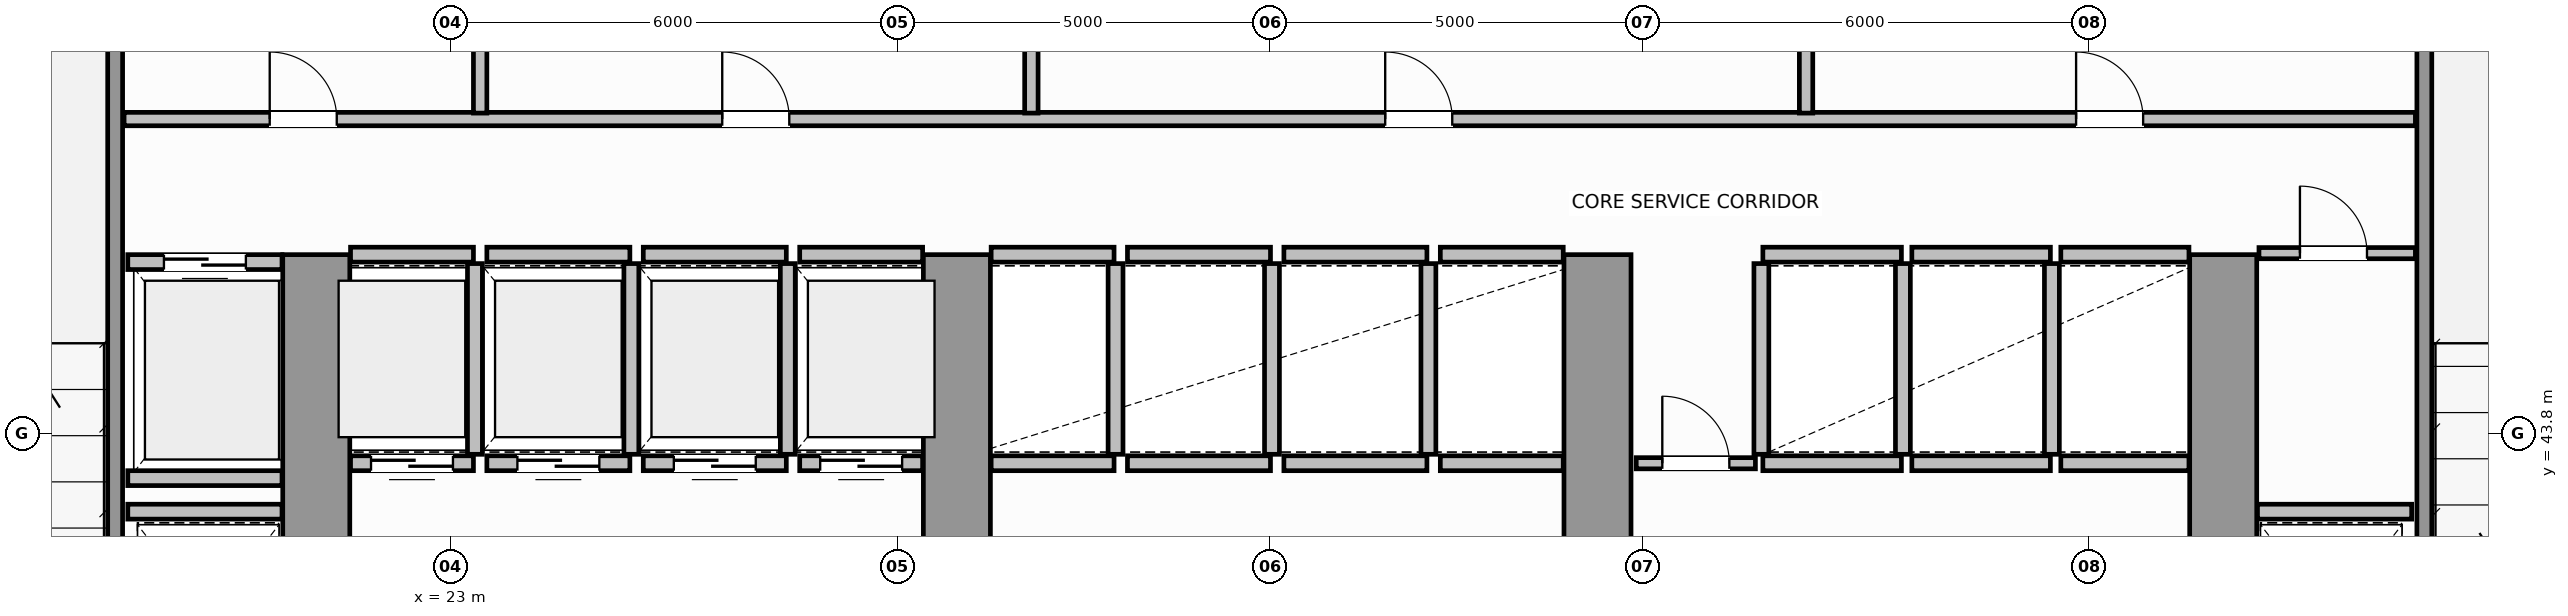
"""IFC4 building model, lengths in metres.
Left out: names, types, materials, properties, quantities, classifications, styles, units other than length and angle.
Written with IfcOpenShell. Run it as: python <this file> out.ifc"""

import sys

from ifc_helpers import new_model, si_unit, direction, frame, frame_2d, origin, place, context, subcontext, project, spatial, rectangle, extrude, source, transform, mapped, element, fill, save


model = new_model("IFC4")
c1 = context("Model", 3, precision=1e-05, world=origin(), true_north=direction((0.0, 1.0)))
c2 = subcontext(c1, "Body", "Model", "MODEL_VIEW")
j1 = project(units=[si_unit("LENGTHUNIT", "METRE"), si_unit("PLANEANGLEUNIT", "RADIAN")], contexts=[c1])
p1 = place(None, origin())
s1 = spatial("IfcSite", under=j1, at=p1, CompositionType="ELEMENT")
p2 = place(p1, origin())
s2 = spatial("IfcBuilding", under=s1, at=p2, CompositionType="ELEMENT")
p3 = place(p2, frame((0.0, 0.0, 53.0)))
s3 = spatial("IfcBuildingStorey", under=s2, at=p3, CompositionType="ELEMENT", Elevation=53.0)
for number, where, z_axis, x_axis in (
    (1, (21.2, 36.97, 0.0), (0.0, 0.0, 1.0), (0.0, 1.0, 0.0)),
    (2, (29.8, 36.97, 0.0), (0.0, 0.0, 1.0), (0.0, 1.0, 0.0)),
    (3, (38.4, 36.97, 0.0), (0.0, 0.0, 1.0), (0.0, 1.0, 0.0)),
    (4, (46.8, 36.97, 0.0), (0.0, 0.0, 1.0), (0.0, 1.0, 0.0)),
):
    element("IfcWall", number, at=place(p3, frame(where, z_axis=z_axis, x_axis=x_axis)), inside=s3, PredefinedType="SHEAR", context=c2, shape_type="SweptSolid", body=[
        extrude(rectangle(XDim=9.23, YDim=0.9, at=frame_2d((4.615, 0.0))), origin(), (0.0, 0.0, 1.0), 3.8),
    ])
for number, where, z_axis, x_axis in (
    (5, (18.5, 39.96, 0.0), (0.0, 0.0, 1.0), (0.0, 1.0, 0.0)),
    (6, (49.5, 39.96, 0.0), (0.0, 0.0, 1.0), (0.0, 1.0, 0.0)),
):
    element("IfcWall", number, at=place(p3, frame(where, z_axis=z_axis, x_axis=x_axis)), inside=s3, PredefinedType="SOLIDWALL", context=c2, shape_type="SweptSolid", body=[
        extrude(rectangle(XDim=9.93, YDim=0.2, at=frame_2d((4.965, 0.0))), origin(), (0.0, 0.0, 1.0), 3.8),
    ])
p4 = place(p3, frame((21.66, 43.4, 0.0), z_axis=(0.0, 0.0, 1.0), x_axis=(1.0, 0.0, 0.0)))
e7 = element("IfcWall", 7, at=p4, inside=s3, PredefinedType="SOLIDWALL", context=c2, shape_type="SweptSolid", body=[
    extrude(rectangle(XDim=1.65, YDim=0.2, at=frame_2d((0.825, 0.0))), origin(), (0.0, 0.0, 1.0), 3.58),
])
p5 = place(p4, frame((0.275, 0.0, 0.0)))
e8 = element("IfcOpeningElement", 8, at=p5, cuts=e7, PredefinedType="OPENING", context=c2, shape_type="SweptSolid", body=[
    extrude(rectangle(XDim=1.1, YDim=2.15, at=frame_2d((0.55, 1.075))), frame((0.0, 0.11, 0.0), z_axis=(0.0, -1.0, 0.0), x_axis=(1.0, 0.0, 0.0)), (0.0, 0.0, 1.0), 0.22),
])
p6 = place(p3, frame((21.66, 46.2, 0.0), z_axis=(0.0, 0.0, 1.0), x_axis=(1.0, 0.0, 0.0)))
e9 = element("IfcWall", 9, at=p6, inside=s3, PredefinedType="SOLIDWALL", context=c2, shape_type="SweptSolid", body=[
    extrude(rectangle(XDim=1.65, YDim=0.2, at=frame_2d((0.825, 0.0))), origin(), (0.0, 0.0, 1.0), 3.58),
])
p7 = place(p3, frame((23.33, 43.52, 0.0), z_axis=(0.0, 0.0, 1.0), x_axis=(0.0, 1.0, 0.0)))
e10 = element("IfcWall", 10, at=p7, inside=s3, PredefinedType="SOLIDWALL", context=c2, shape_type="SweptSolid", body=[
    extrude(rectangle(XDim=2.56, YDim=0.2, at=frame_2d((1.28, 0.0))), origin(), (0.0, 0.0, 1.0), 3.58),
])
p8 = place(p3, frame((23.49, 43.4, 0.0), z_axis=(0.0, 0.0, 1.0), x_axis=(1.0, 0.0, 0.0)))
e11 = element("IfcWall", 11, at=p8, inside=s3, PredefinedType="SOLIDWALL", context=c2, shape_type="SweptSolid", body=[
    extrude(rectangle(XDim=1.92, YDim=0.2, at=frame_2d((0.96, 0.0))), origin(), (0.0, 0.0, 1.0), 3.58),
])
p9 = place(p8, frame((0.41, 0.0, 0.0)))
e12 = element("IfcOpeningElement", 12, at=p9, cuts=e11, PredefinedType="OPENING", context=c2, shape_type="SweptSolid", body=[
    extrude(rectangle(XDim=1.1, YDim=2.15, at=frame_2d((0.55, 1.075))), frame((0.0, 0.11, 0.0), z_axis=(0.0, -1.0, 0.0), x_axis=(1.0, 0.0, 0.0)), (0.0, 0.0, 1.0), 0.22),
])
p10 = place(p3, frame((23.49, 46.2, 0.0), z_axis=(0.0, 0.0, 1.0), x_axis=(1.0, 0.0, 0.0)))
e13 = element("IfcWall", 13, at=p10, inside=s3, PredefinedType="SOLIDWALL", context=c2, shape_type="SweptSolid", body=[
    extrude(rectangle(XDim=1.92, YDim=0.2, at=frame_2d((0.96, 0.0))), origin(), (0.0, 0.0, 1.0), 3.58),
])
p11 = place(p3, frame((25.43, 43.52, 0.0), z_axis=(0.0, 0.0, 1.0), x_axis=(0.0, 1.0, 0.0)))
e14 = element("IfcWall", 14, at=p11, inside=s3, PredefinedType="SOLIDWALL", context=c2, shape_type="SweptSolid", body=[
    extrude(rectangle(XDim=2.56, YDim=0.2, at=frame_2d((1.28, 0.0))), origin(), (0.0, 0.0, 1.0), 3.58),
])
p12 = place(p3, frame((25.59, 43.4, 0.0), z_axis=(0.0, 0.0, 1.0), x_axis=(1.0, 0.0, 0.0)))
e15 = element("IfcWall", 15, at=p12, inside=s3, PredefinedType="SOLIDWALL", context=c2, shape_type="SweptSolid", body=[
    extrude(rectangle(XDim=1.92, YDim=0.2, at=frame_2d((0.96, 0.0))), origin(), (0.0, 0.0, 1.0), 3.58),
])
p13 = place(p12, frame((0.41, 0.0, 0.0)))
e16 = element("IfcOpeningElement", 16, at=p13, cuts=e15, PredefinedType="OPENING", context=c2, shape_type="SweptSolid", body=[
    extrude(rectangle(XDim=1.1, YDim=2.15, at=frame_2d((0.55, 1.075))), frame((0.0, 0.11, 0.0), z_axis=(0.0, -1.0, 0.0), x_axis=(1.0, 0.0, 0.0)), (0.0, 0.0, 1.0), 0.22),
])
p14 = place(p3, frame((25.59, 46.2, 0.0), z_axis=(0.0, 0.0, 1.0), x_axis=(1.0, 0.0, 0.0)))
e17 = element("IfcWall", 17, at=p14, inside=s3, PredefinedType="SOLIDWALL", context=c2, shape_type="SweptSolid", body=[
    extrude(rectangle(XDim=1.92, YDim=0.2, at=frame_2d((0.96, 0.0))), origin(), (0.0, 0.0, 1.0), 3.58),
])
p15 = place(p3, frame((27.53, 43.52, 0.0), z_axis=(0.0, 0.0, 1.0), x_axis=(0.0, 1.0, 0.0)))
e18 = element("IfcWall", 18, at=p15, inside=s3, PredefinedType="SOLIDWALL", context=c2, shape_type="SweptSolid", body=[
    extrude(rectangle(XDim=2.56, YDim=0.2, at=frame_2d((1.28, 0.0))), origin(), (0.0, 0.0, 1.0), 3.58),
])
p16 = place(p3, frame((27.69, 43.4, 0.0), z_axis=(0.0, 0.0, 1.0), x_axis=(1.0, 0.0, 0.0)))
e19 = element("IfcWall", 19, at=p16, inside=s3, PredefinedType="SOLIDWALL", context=c2, shape_type="SweptSolid", body=[
    extrude(rectangle(XDim=1.65, YDim=0.2, at=frame_2d((0.825, 0.0))), origin(), (0.0, 0.0, 1.0), 3.58),
])
p17 = place(p16, frame((0.275, 0.0, 0.0)))
e20 = element("IfcOpeningElement", 20, at=p17, cuts=e19, PredefinedType="OPENING", context=c2, shape_type="SweptSolid", body=[
    extrude(rectangle(XDim=1.1, YDim=2.15, at=frame_2d((0.55, 1.075))), frame((0.0, 0.11, 0.0), z_axis=(0.0, -1.0, 0.0), x_axis=(1.0, 0.0, 0.0)), (0.0, 0.0, 1.0), 0.22),
])
p18 = place(p3, frame((27.69, 46.2, 0.0), z_axis=(0.0, 0.0, 1.0), x_axis=(1.0, 0.0, 0.0)))
e21 = element("IfcWall", 21, at=p18, inside=s3, PredefinedType="SOLIDWALL", context=c2, shape_type="SweptSolid", body=[
    extrude(rectangle(XDim=1.65, YDim=0.2, at=frame_2d((0.825, 0.0))), origin(), (0.0, 0.0, 1.0), 3.58),
])
for number, where, z_axis, x_axis in (
    (22, (30.26, 43.4, 0.0), (0.0, 0.0, 1.0), (1.0, 0.0, 0.0)),
    (23, (30.26, 46.2, 0.0), (0.0, 0.0, 1.0), (1.0, 0.0, 0.0)),
):
    element("IfcWall", number, at=place(p3, frame(where, z_axis=z_axis, x_axis=x_axis)), inside=s3, PredefinedType="SOLIDWALL", context=c2, shape_type="SweptSolid", body=[
        extrude(rectangle(XDim=1.65, YDim=0.2, at=frame_2d((0.825, 0.0))), origin(), (0.0, 0.0, 1.0), 3.58),
    ])
p19 = place(p3, frame((31.93, 43.52, 0.0), z_axis=(0.0, 0.0, 1.0), x_axis=(0.0, 1.0, 0.0)))
e24 = element("IfcWall", 24, at=p19, inside=s3, PredefinedType="SOLIDWALL", context=c2, shape_type="SweptSolid", body=[
    extrude(rectangle(XDim=2.56, YDim=0.2, at=frame_2d((1.28, 0.0))), origin(), (0.0, 0.0, 1.0), 3.58),
])
for number, where, z_axis, x_axis in (
    (25, (32.09, 43.4, 0.0), (0.0, 0.0, 1.0), (1.0, 0.0, 0.0)),
    (26, (32.09, 46.2, 0.0), (0.0, 0.0, 1.0), (1.0, 0.0, 0.0)),
):
    element("IfcWall", number, at=place(p3, frame(where, z_axis=z_axis, x_axis=x_axis)), inside=s3, PredefinedType="SOLIDWALL", context=c2, shape_type="SweptSolid", body=[
        extrude(rectangle(XDim=1.92, YDim=0.2, at=frame_2d((0.96, 0.0))), origin(), (0.0, 0.0, 1.0), 3.58),
    ])
p20 = place(p3, frame((34.03, 43.52, 0.0), z_axis=(0.0, 0.0, 1.0), x_axis=(0.0, 1.0, 0.0)))
e27 = element("IfcWall", 27, at=p20, inside=s3, PredefinedType="SOLIDWALL", context=c2, shape_type="SweptSolid", body=[
    extrude(rectangle(XDim=2.56, YDim=0.2, at=frame_2d((1.28, 0.0))), origin(), (0.0, 0.0, 1.0), 3.58),
])
for number, where, z_axis, x_axis in (
    (28, (34.19, 43.4, 0.0), (0.0, 0.0, 1.0), (1.0, 0.0, 0.0)),
    (29, (34.19, 46.2, 0.0), (0.0, 0.0, 1.0), (1.0, 0.0, 0.0)),
):
    element("IfcWall", number, at=place(p3, frame(where, z_axis=z_axis, x_axis=x_axis)), inside=s3, PredefinedType="SOLIDWALL", context=c2, shape_type="SweptSolid", body=[
        extrude(rectangle(XDim=1.92, YDim=0.2, at=frame_2d((0.96, 0.0))), origin(), (0.0, 0.0, 1.0), 3.58),
    ])
p21 = place(p3, frame((36.13, 43.52, 0.0), z_axis=(0.0, 0.0, 1.0), x_axis=(0.0, 1.0, 0.0)))
e30 = element("IfcWall", 30, at=p21, inside=s3, PredefinedType="SOLIDWALL", context=c2, shape_type="SweptSolid", body=[
    extrude(rectangle(XDim=2.56, YDim=0.2, at=frame_2d((1.28, 0.0))), origin(), (0.0, 0.0, 1.0), 3.58),
])
for number, where, z_axis, x_axis in (
    (31, (36.29, 43.4, 0.0), (0.0, 0.0, 1.0), (1.0, 0.0, 0.0)),
    (32, (36.29, 46.2, 0.0), (0.0, 0.0, 1.0), (1.0, 0.0, 0.0)),
):
    element("IfcWall", number, at=place(p3, frame(where, z_axis=z_axis, x_axis=x_axis)), inside=s3, PredefinedType="SOLIDWALL", context=c2, shape_type="SweptSolid", body=[
        extrude(rectangle(XDim=1.65, YDim=0.2, at=frame_2d((0.825, 0.0))), origin(), (0.0, 0.0, 1.0), 3.58),
    ])
for number, where, z_axis, x_axis in (
    (33, (40.62, 43.4, 0.0), (0.0, 0.0, 1.0), (1.0, 0.0, 0.0)),
    (34, (40.62, 46.2, 0.0), (0.0, 0.0, 1.0), (1.0, 0.0, 0.0)),
):
    element("IfcWall", number, at=place(p3, frame(where, z_axis=z_axis, x_axis=x_axis)), inside=s3, PredefinedType="SOLIDWALL", context=c2, shape_type="SweptSolid", body=[
        extrude(rectangle(XDim=1.86, YDim=0.2, at=frame_2d((0.93, 0.0))), origin(), (0.0, 0.0, 1.0), 3.58),
    ])
for number, where, z_axis, x_axis in (
    (35, (40.6, 43.52, 0.0), (0.0, 0.0, 1.0), (0.0, 1.0, 0.0)),
    (36, (42.5, 43.52, 0.0), (0.0, 0.0, 1.0), (0.0, 1.0, 0.0)),
):
    element("IfcWall", number, at=place(p3, frame(where, z_axis=z_axis, x_axis=x_axis)), inside=s3, PredefinedType="SOLIDWALL", context=c2, shape_type="SweptSolid", body=[
        extrude(rectangle(XDim=2.56, YDim=0.2, at=frame_2d((1.28, 0.0))), origin(), (0.0, 0.0, 1.0), 3.58),
    ])
for number, where, z_axis, x_axis in (
    (37, (42.62, 43.4, 0.0), (0.0, 0.0, 1.0), (1.0, 0.0, 0.0)),
    (38, (42.62, 46.2, 0.0), (0.0, 0.0, 1.0), (1.0, 0.0, 0.0)),
):
    element("IfcWall", number, at=place(p3, frame(where, z_axis=z_axis, x_axis=x_axis)), inside=s3, PredefinedType="SOLIDWALL", context=c2, shape_type="SweptSolid", body=[
        extrude(rectangle(XDim=1.86, YDim=0.2, at=frame_2d((0.93, 0.0))), origin(), (0.0, 0.0, 1.0), 3.58),
    ])
p22 = place(p3, frame((44.5, 43.52, 0.0), z_axis=(0.0, 0.0, 1.0), x_axis=(0.0, 1.0, 0.0)))
e39 = element("IfcWall", 39, at=p22, inside=s3, PredefinedType="SOLIDWALL", context=c2, shape_type="SweptSolid", body=[
    extrude(rectangle(XDim=2.56, YDim=0.2, at=frame_2d((1.28, 0.0))), origin(), (0.0, 0.0, 1.0), 3.58),
])
for number, where, z_axis, x_axis in (
    (40, (44.62, 43.4, 0.0), (0.0, 0.0, 1.0), (1.0, 0.0, 0.0)),
    (41, (44.62, 46.2, 0.0), (0.0, 0.0, 1.0), (1.0, 0.0, 0.0)),
):
    element("IfcWall", number, at=place(p3, frame(where, z_axis=z_axis, x_axis=x_axis)), inside=s3, PredefinedType="SOLIDWALL", context=c2, shape_type="SweptSolid", body=[
        extrude(rectangle(XDim=1.72, YDim=0.2, at=frame_2d((0.86, 0.0))), origin(), (0.0, 0.0, 1.0), 3.58),
    ])
p23 = place(p3, frame((18.67, 46.1, 0.0), z_axis=(0.0, 0.0, 1.0), x_axis=(1.0, 0.0, 0.0)))
e42 = element("IfcWall", 42, at=p23, inside=s3, PredefinedType="SOLIDWALL", context=c2, shape_type="SweptSolid", body=[
    extrude(rectangle(XDim=2.07, YDim=0.2, at=frame_2d((1.035, 0.0))), origin(), (0.0, 0.0, 1.0), 3.58),
])
p24 = place(p23, frame((0.485, 0.0, 0.0)))
e43 = element("IfcOpeningElement", 43, at=p24, cuts=e42, PredefinedType="OPENING", context=c2, shape_type="SweptSolid", body=[
    extrude(rectangle(XDim=1.1, YDim=2.15, at=frame_2d((0.55, 1.075))), frame((0.0, 0.11, 0.0), z_axis=(0.0, -1.0, 0.0), x_axis=(1.0, 0.0, 0.0)), (0.0, 0.0, 1.0), 0.22),
])
for number, where, z_axis, x_axis in (
    (44, (18.67, 43.2, 0.0), (0.0, 0.0, 1.0), (1.0, 0.0, 0.0)),
    (45, (18.67, 42.75, 0.0), (0.0, 0.0, 1.0), (1.0, 0.0, 0.0)),
    (46, (47.26, 42.75, 0.0), (0.0, 0.0, 1.0), (1.0, 0.0, 0.0)),
):
    element("IfcWall", number, at=place(p3, frame(where, z_axis=z_axis, x_axis=x_axis)), inside=s3, PredefinedType="SOLIDWALL", context=c2, shape_type="SweptSolid", body=[
        extrude(rectangle(XDim=2.07, YDim=0.2, at=frame_2d((1.035, 0.0))), origin(), (0.0, 0.0, 1.0), 3.58),
    ])
p25 = place(p3, frame((47.28, 46.22, 0.0), z_axis=(0.0, 0.0, 1.0), x_axis=(1.0, 0.0, 0.0)))
e47 = element("IfcWall", 47, at=p25, inside=s3, PredefinedType="PARTITIONING", context=c2, shape_type="SweptSolid", body=[
    extrude(rectangle(XDim=2.1, YDim=0.15, at=frame_2d((1.05, 0.0))), origin(), (0.0, 0.0, 1.0), 3.58),
])
p26 = place(p25, frame((0.55, 0.0, 0.0)))
e48 = element("IfcOpeningElement", 48, at=p26, cuts=e47, PredefinedType="OPENING", context=c2, shape_type="SweptSolid", body=[
    extrude(rectangle(XDim=0.9, YDim=2.1, at=frame_2d((0.45, 1.05))), frame((0.0, 0.085, 0.0), z_axis=(0.0, -1.0, 0.0), x_axis=(1.0, 0.0, 0.0)), (0.0, 0.0, 1.0), 0.17),
])
p27 = place(p3, frame((38.92, 43.4, 0.0), z_axis=(0.0, 0.0, 1.0), x_axis=(1.0, 0.0, 0.0)))
e49 = element("IfcWall", 49, at=p27, inside=s3, PredefinedType="PARTITIONING", context=c2, shape_type="SweptSolid", body=[
    extrude(rectangle(XDim=1.6, YDim=0.15, at=frame_2d((0.8, 0.0))), origin(), (0.0, 0.0, 1.0), 3.58),
])
p28 = place(p27, frame((0.35, 0.0, 0.0)))
e50 = element("IfcOpeningElement", 50, at=p28, cuts=e49, PredefinedType="OPENING", context=c2, shape_type="SweptSolid", body=[
    extrude(rectangle(XDim=0.9, YDim=2.1, at=frame_2d((0.45, 1.05))), frame((0.0, 0.085, 0.0), z_axis=(0.0, -1.0, 0.0), x_axis=(1.0, 0.0, 0.0)), (0.0, 0.0, 1.0), 0.17),
])
p29 = place(p3, frame((18.62, 48.02, 0.0), z_axis=(0.0, 0.0, 1.0), x_axis=(1.0, 0.0, 0.0)))
e51 = element("IfcWall", 51, at=p29, inside=s3, PredefinedType="PLUMBINGWALL", context=c2, shape_type="SweptSolid", body=[
    extrude(rectangle(XDim=30.76, YDim=0.18, at=frame_2d((15.38, 0.0))), origin(), (0.0, 0.0, 1.0), 3.58),
])
p30 = place(p29, frame((1.955, 0.0, 0.0)))
e52 = element("IfcOpeningElement", 52, at=p30, cuts=e51, PredefinedType="OPENING", context=c2, shape_type="SweptSolid", body=[
    extrude(rectangle(XDim=0.9, YDim=2.15, at=frame_2d((0.45, 1.075))), frame((0.0, 0.1, 0.0), z_axis=(0.0, -1.0, 0.0), x_axis=(1.0, 0.0, 0.0)), (0.0, 0.0, 1.0), 0.2),
])
p31 = place(p29, frame((8.03, 0.0, 0.0)))
e53 = element("IfcOpeningElement", 53, at=p31, cuts=e51, PredefinedType="OPENING", context=c2, shape_type="SweptSolid", body=[
    extrude(rectangle(XDim=0.9, YDim=2.15, at=frame_2d((0.45, 1.075))), frame((0.0, 0.1, 0.0), z_axis=(0.0, -1.0, 0.0), x_axis=(1.0, 0.0, 0.0)), (0.0, 0.0, 1.0), 0.2),
])
p32 = place(p29, frame((16.93, 0.0, 0.0)))
e54 = element("IfcOpeningElement", 54, at=p32, cuts=e51, PredefinedType="OPENING", context=c2, shape_type="SweptSolid", body=[
    extrude(rectangle(XDim=0.9, YDim=2.15, at=frame_2d((0.45, 1.075))), frame((0.0, 0.1, 0.0), z_axis=(0.0, -1.0, 0.0), x_axis=(1.0, 0.0, 0.0)), (0.0, 0.0, 1.0), 0.2),
])
p33 = place(p29, frame((26.205, 0.0, 0.0)))
e55 = element("IfcOpeningElement", 55, at=p33, cuts=e51, PredefinedType="OPENING", context=c2, shape_type="SweptSolid", body=[
    extrude(rectangle(XDim=0.9, YDim=2.15, at=frame_2d((0.45, 1.075))), frame((0.0, 0.1, 0.0), z_axis=(0.0, -1.0, 0.0), x_axis=(1.0, 0.0, 0.0)), (0.0, 0.0, 1.0), 0.2),
])
for number, where, z_axis, x_axis in (
    (56, (23.4, 48.1, 0.0), (0.0, 0.0, 1.0), (0.0, 1.0, 0.0)),
    (57, (30.8, 48.1, 0.0), (0.0, 0.0, 1.0), (0.0, 1.0, 0.0)),
    (58, (41.2, 48.1, 0.0), (0.0, 0.0, 1.0), (0.0, 1.0, 0.0)),
):
    element("IfcWall", number, at=place(p3, frame(where, z_axis=z_axis, x_axis=x_axis)), inside=s3, PredefinedType="PLUMBINGWALL", context=c2, shape_type="SweptSolid", body=[
        extrude(rectangle(XDim=1.98, YDim=0.18, at=frame_2d((0.99, 0.0))), origin(), (0.0, 0.0, 1.0), 3.58),
    ])
m1 = source(origin(), c2, "Body", "SweptSolid", [
    extrude(rectangle(XDim=1.1, YDim=2.15, at=frame_2d((0.55, 1.075))), frame((0.0, 0.025, 0.0), z_axis=(0.0, -1.0, 0.0), x_axis=(1.0, 0.0, 0.0)), (0.0, 0.0, 1.0), 0.05),
])
p34 = place(p5, origin())
e59 = element("IfcDoor", 59, at=p34, inside=s3, OperationType="DOUBLE_DOOR_SLIDING", PredefinedType="DOOR", context=c2, shape_type="MappedRepresentation", body=[
    mapped(m1, transform((0.0, 0.0, 0.0), scale=1.0)),
])
fill(e8, e59)
p35 = place(p9, origin())
e60 = element("IfcDoor", 60, at=p35, inside=s3, OperationType="DOUBLE_DOOR_SLIDING", PredefinedType="DOOR", context=c2, shape_type="MappedRepresentation", body=[
    mapped(m1, transform((0.0, 0.0, 0.0), scale=1.0)),
])
fill(e12, e60)
p36 = place(p13, origin())
e61 = element("IfcDoor", 61, at=p36, inside=s3, OperationType="DOUBLE_DOOR_SLIDING", PredefinedType="DOOR", context=c2, shape_type="MappedRepresentation", body=[
    mapped(m1, transform((0.0, 0.0, 0.0), scale=1.0)),
])
fill(e16, e61)
p37 = place(p17, origin())
e62 = element("IfcDoor", 62, at=p37, inside=s3, OperationType="DOUBLE_DOOR_SLIDING", PredefinedType="DOOR", context=c2, shape_type="MappedRepresentation", body=[
    mapped(m1, transform((0.0, 0.0, 0.0), scale=1.0)),
])
fill(e20, e62)
p38 = place(p24, origin())
e63 = element("IfcDoor", 63, at=p38, inside=s3, OperationType="DOUBLE_DOOR_SLIDING", PredefinedType="DOOR", context=c2, shape_type="MappedRepresentation", body=[
    mapped(m1, transform((0.0, 0.0, 0.0), scale=1.0)),
])
fill(e43, e63)
m2 = source(origin(), c2, "Body", "SweptSolid", [
    extrude(rectangle(XDim=0.9, YDim=2.1, at=frame_2d((0.45, 1.05))), frame((0.0, 0.025, 0.0), z_axis=(0.0, -1.0, 0.0), x_axis=(1.0, 0.0, 0.0)), (0.0, 0.0, 1.0), 0.05),
])
p39 = place(p26, origin())
e64 = element("IfcDoor", 64, at=p39, inside=s3, OperationType="SINGLE_SWING_RIGHT", PredefinedType="DOOR", context=c2, shape_type="MappedRepresentation", body=[
    mapped(m2, transform((0.0, 0.0, 0.0), scale=1.0)),
])
fill(e48, e64)
p40 = place(p28, origin())
e65 = element("IfcDoor", 65, at=p40, inside=s3, OperationType="SINGLE_SWING_LEFT", PredefinedType="DOOR", context=c2, shape_type="MappedRepresentation", body=[
    mapped(m2, transform((0.0, 0.0, 0.0), scale=1.0)),
])
fill(e50, e65)
m3 = source(origin(), c2, "Body", "SweptSolid", [
    extrude(rectangle(XDim=0.9, YDim=2.15, at=frame_2d((0.45, 1.075))), frame((0.0, 0.025, 0.0), z_axis=(0.0, -1.0, 0.0), x_axis=(1.0, 0.0, 0.0)), (0.0, 0.0, 1.0), 0.05),
])
p41 = place(p30, origin())
e66 = element("IfcDoor", 66, at=p41, inside=s3, OperationType="SINGLE_SWING_LEFT", PredefinedType="DOOR", context=c2, shape_type="MappedRepresentation", body=[
    mapped(m3, transform((0.0, 0.0, 0.0), scale=1.0)),
])
fill(e52, e66)
p42 = place(p31, origin())
e67 = element("IfcDoor", 67, at=p42, inside=s3, OperationType="SINGLE_SWING_RIGHT", PredefinedType="DOOR", context=c2, shape_type="MappedRepresentation", body=[
    mapped(m3, transform((0.0, 0.0, 0.0), scale=1.0)),
])
fill(e53, e67)
p43 = place(p32, origin())
e68 = element("IfcDoor", 68, at=p43, inside=s3, OperationType="SINGLE_SWING_LEFT", PredefinedType="DOOR", context=c2, shape_type="MappedRepresentation", body=[
    mapped(m3, transform((0.0, 0.0, 0.0), scale=1.0)),
])
fill(e54, e68)
p44 = place(p33, origin())
e69 = element("IfcDoor", 69, at=p44, inside=s3, OperationType="SINGLE_SWING_RIGHT", PredefinedType="DOOR", context=c2, shape_type="MappedRepresentation", body=[
    mapped(m3, transform((0.0, 0.0, 0.0), scale=1.0)),
])
fill(e55, e69)
save(model, sys.argv[1])
